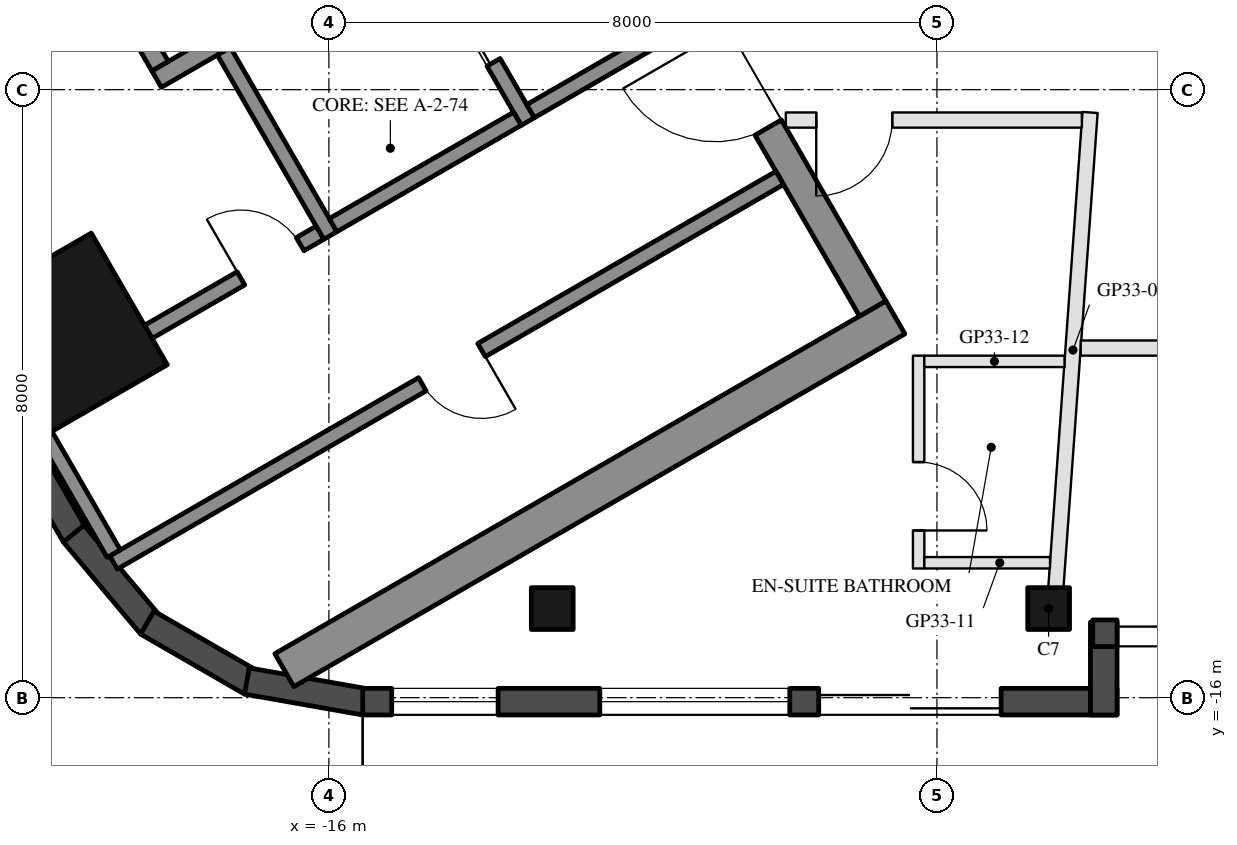
"""IFC4 building model, lengths in metres.
Left out: names, types, materials, properties, quantities, classifications, styles, units other than length and angle.
Written with IfcOpenShell. Run it as: python <this file> out.ifc"""

import sys

from ifc_helpers import new_model, si_unit, direction, frame, frame_2d, origin, origin_2d, place, context, subcontext, project, spatial, rectangle, hollow_rectangle, extrude, boolean, halfspace, element, fill, save


model = new_model("IFC4")
c1 = context("Model", 3, precision=1e-05, world=origin(), true_north=direction((0.0, 1.0)))
c2 = subcontext(c1, "Body", "Model", "MODEL_VIEW")
j1 = project(units=[si_unit("LENGTHUNIT", "METRE"), si_unit("PLANEANGLEUNIT", "RADIAN")], contexts=[c1])
p1 = place(None, origin())
s1 = spatial("IfcSite", under=j1, at=p1, CompositionType="ELEMENT")
p2 = place(p1, origin())
s2 = spatial("IfcBuilding", under=s1, at=p2, CompositionType="ELEMENT")
p3 = place(p2, frame((0.0, 0.0, 317.0)))
s3 = spatial("IfcBuildingStorey", under=s2, at=p3, CompositionType="ELEMENT", Elevation=317.0)
p4 = place(p3, frame((-13.061, -14.827, 0.0), z_axis=(0.0, 0.0, 1.0), x_axis=(-1.0, 0.0, 0.0)))
e1 = element("IfcColumn", 1, at=p4, inside=s3, PredefinedType="COLUMN", context=c2, shape_type="SweptSolid", body=[
    boolean("DIFFERENCE", extrude(hollow_rectangle(XDim=0.55, YDim=0.55, WallThickness=0.025, at=origin_2d()), origin(), (0.0, 0.0, 1.0), 3.7), halfspace(frame((0.0, 0.0, 3.66), z_axis=(0.0, 0.0, 1.0), x_axis=(1.0, 0.0, 0.0)), False)),
])
p5 = place(p3, frame((-6.531, -14.827, 0.0), z_axis=(0.0, 0.0, 1.0), x_axis=(-1.0, 0.0, 0.0)))
e2 = element("IfcColumn", 2, at=p5, inside=s3, PredefinedType="COLUMN", context=c2, shape_type="SweptSolid", body=[
    boolean("DIFFERENCE", extrude(hollow_rectangle(XDim=0.55, YDim=0.55, WallThickness=0.025, at=origin_2d()), origin(), (0.0, 0.0, 1.0), 3.7), halfspace(frame((0.0, 0.0, 3.666), z_axis=(0.0, 0.0, 1.0), x_axis=(1.0, 0.0, 0.0)), False)),
])
p6 = place(p3, frame((-19.492, -11.254, 0.0), z_axis=(0.0, 0.0, 1.0), x_axis=(-0.5, 0.866025403784, 0.0)))
e3 = element("IfcColumn", 3, at=p6, inside=s3, PredefinedType="COLUMN", context=c2, shape_type="SweptSolid", body=[
    boolean("DIFFERENCE", extrude(hollow_rectangle(XDim=2.0, YDim=2.0, WallThickness=0.05, at=origin_2d()), origin(), (0.0, 0.0, 1.0), 3.7), halfspace(frame((0.0, 0.0, 3.587), z_axis=(0.0, 0.0, 1.0), x_axis=(1.0, 0.0, 0.0)), False)),
])
p7 = place(p3, frame((-21.679, -9.816, 0.0), z_axis=(0.0, 0.0, 1.0), x_axis=(0.500023656998, -0.86601174498, 0.0)))
e4 = element("IfcWall", 4, at=p7, inside=s3, PredefinedType="SOLIDWALL", context=c2, shape_type="SweptSolid", body=[
    extrude(rectangle(XDim=4.677, YDim=0.35, at=frame_2d((2.339, 0.0))), origin(), (0.0, 0.0, 1.0), 3.55),
])
for number, where, z_axis, x_axis in (
    (5, (-19.358, -13.842, 0.0), (0.0, 0.0, 1.0), (0.643, -0.766, 0.0)),
    (6, (-18.389, -15.012, 0.0), (0.0, 0.0, 1.0), (0.866, -0.5, 0.0)),
    (7, (-17.079, -15.781, 0.0), (0.0, 0.0, 1.0), (0.985, -0.174, 0.0)),
):
    element("IfcWall", number, at=place(p3, frame(where, z_axis=z_axis, x_axis=x_axis)), inside=s3, PredefinedType="SOLIDWALL", context=c2, shape_type="SweptSolid", body=[
        extrude(rectangle(XDim=1.579, YDim=0.35, at=frame_2d((0.79, 0.0))), origin(), (0.0, 0.0, 1.0), 3.55),
    ])
p8 = place(p3, frame((-15.554, -16.052, 0.0), z_axis=(0.0, 0.0, 1.0), x_axis=(1.0, 0.0, 0.0)))
e8 = element("IfcWall", 8, at=p8, inside=s3, PredefinedType="SOLIDWALL", context=c2, shape_type="SweptSolid", body=[
    extrude(rectangle(XDim=9.924, YDim=0.35, at=frame_2d((4.962, 0.0))), origin(), (0.0, 0.0, 1.0), 3.55),
])
p9 = place(p8, frame((0.381, 0.0, 0.3)))
e9 = element("IfcOpeningElement", 9, at=p9, cuts=e8, PredefinedType="OPENING", context=c2, shape_type="SweptSolid", body=[
    extrude(rectangle(XDim=1.4, YDim=2.65, at=frame_2d((0.7, 1.325))), frame((0.0, 0.185, 0.0), z_axis=(0.0, -1.0, 0.0), x_axis=(1.0, 0.0, 0.0)), (0.0, 0.0, 1.0), 0.37),
])
p10 = place(p8, frame((5.999, 0.0, 0.0)))
e10 = element("IfcOpeningElement", 10, at=p10, cuts=e8, PredefinedType="OPENING", context=c2, shape_type="SweptSolid", body=[
    extrude(rectangle(XDim=2.4, YDim=2.4, at=frame_2d((1.2, 1.2))), frame((0.0, 0.185, 0.0), z_axis=(0.0, -1.0, 0.0), x_axis=(1.0, 0.0, 0.0)), (0.0, 0.0, 1.0), 0.37),
])
p11 = place(p8, frame((3.118, 0.0, 0.3)))
e11 = element("IfcOpeningElement", 11, at=p11, cuts=e8, PredefinedType="OPENING", context=c2, shape_type="SweptSolid", body=[
    extrude(rectangle(XDim=2.5, YDim=2.65, at=frame_2d((1.25, 1.325))), frame((0.0, 0.185, 0.0), z_axis=(0.0, -1.0, 0.0), x_axis=(1.0, 0.0, 0.0)), (0.0, 0.0, 1.0), 0.37),
])
p12 = place(p3, frame((-5.806, -16.228, 0.0), z_axis=(0.0, 0.0, 1.0), x_axis=(0.0, 1.0, 0.0)))
e12 = element("IfcWall", 12, at=p12, inside=s3, PredefinedType="SOLIDWALL", context=c2, shape_type="SweptSolid", body=[
    extrude(rectangle(XDim=1.22, YDim=0.35, at=frame_2d((0.61, 0.0))), origin(), (0.0, 0.0, 1.0), 3.55),
])
p13 = place(p3, frame((-5.951, -15.153, 0.0), z_axis=(0.0, 0.0, 1.0), x_axis=(1.0, 0.0, 0.0)))
e13 = element("IfcWall", 13, at=p13, inside=s3, PredefinedType="SOLIDWALL", context=c2, shape_type="SweptSolid", body=[
    extrude(rectangle(XDim=5.371, YDim=0.35, at=frame_2d((2.685, 0.0))), origin(), (0.0, 0.0, 1.0), 3.55),
])
p14 = place(p13, frame((0.32, 0.0, 0.0)))
e14 = element("IfcOpeningElement", 14, at=p14, cuts=e13, PredefinedType="OPENING", context=c2, shape_type="SweptSolid", body=[
    extrude(rectangle(XDim=2.4, YDim=2.4, at=frame_2d((1.2, 1.2))), frame((0.0, 0.185, 0.0), z_axis=(0.0, -1.0, 0.0), x_axis=(1.0, 0.0, 0.0)), (0.0, 0.0, 1.0), 0.37),
])
p15 = place(p13, frame((3.02, 0.0, 0.3)))
e15 = element("IfcOpeningElement", 15, at=p15, cuts=e13, PredefinedType="OPENING", context=c2, shape_type="SweptSolid", body=[
    extrude(rectangle(XDim=1.5, YDim=2.65, at=frame_2d((0.75, 1.325))), frame((0.0, 0.185, 0.0), z_axis=(0.0, -1.0, 0.0), x_axis=(1.0, 0.0, 0.0)), (0.0, 0.0, 1.0), 0.37),
])
p16 = place(p3, frame((-8.547, -10.997, 0.0), z_axis=(0.0, 0.0, 1.0), x_axis=(-0.866025286072, -0.500000203884, 0.0)))
e16 = element("IfcWall", 16, at=p16, inside=s3, PredefinedType="SHEAR", context=c2, shape_type="SweptSolid", body=[
    extrude(rectangle(XDim=9.283, YDim=0.5, at=frame_2d((4.641, 0.0))), origin(), (0.0, 0.0, 1.0), 3.5),
])
p17 = place(p3, frame((-13.845, -2.22, 0.0), z_axis=(0.0, 0.0, 1.0), x_axis=(0.500004234368, -0.866022959057, 0.0)))
e17 = element("IfcWall", 17, at=p17, inside=s3, PredefinedType="SHEAR", context=c2, shape_type="SweptSolid", body=[
    extrude(rectangle(XDim=10.0, YDim=0.4, at=frame_2d((5.0, 0.0))), origin(), (0.0, 0.0, 1.0), 3.5),
])
p18 = place(p17, frame((3.55, 0.0, 0.0)))
e18 = element("IfcOpeningElement", 18, at=p18, cuts=e17, PredefinedType="OPENING", context=c2, shape_type="SweptSolid", body=[
    extrude(rectangle(XDim=1.1, YDim=2.1, at=frame_2d((0.55, 1.05))), frame((0.0, 0.21, 0.0), z_axis=(0.0, -1.0, 0.0), x_axis=(1.0, 0.0, 0.0)), (0.0, 0.0, 1.0), 0.42),
])
p19 = place(p17, frame((5.85, 0.0, 0.0)))
e19 = element("IfcOpeningElement", 19, at=p19, cuts=e17, PredefinedType="OPENING", context=c2, shape_type="SweptSolid", body=[
    extrude(rectangle(XDim=1.4, YDim=2.1, at=frame_2d((0.7, 1.05))), frame((0.0, 0.21, 0.0), z_axis=(0.0, -1.0, 0.0), x_axis=(1.0, 0.0, 0.0)), (0.0, 0.0, 1.0), 0.42),
])
p20 = place(p3, frame((-12.681, -4.636, 0.0), z_axis=(0.0, 0.0, 1.0), x_axis=(-0.866021702275, -0.500006411147, 0.0)))
e20 = element("IfcWall", 20, at=p20, inside=s3, PredefinedType="SHEAR", context=c2, shape_type="SweptSolid", body=[
    extrude(rectangle(XDim=6.45, YDim=0.25, at=frame_2d((3.225, 0.0))), origin(), (0.0, 0.0, 1.0), 3.5),
])
p21 = place(p20, frame((0.3, 0.0, 0.0)))
e21 = element("IfcOpeningElement", 21, at=p21, cuts=e20, PredefinedType="OPENING", context=c2, shape_type="SweptSolid", body=[
    extrude(rectangle(XDim=1.0, YDim=2.1, at=frame_2d((0.5, 1.05))), frame((0.0, 0.135, 0.0), z_axis=(0.0, -1.0, 0.0), x_axis=(1.0, 0.0, 0.0)), (0.0, 0.0, 1.0), 0.27),
])
p22 = place(p3, frame((-19.496, -5.482, 0.0), z_axis=(0.0, 0.0, 1.0), x_axis=(0.499990435942, -0.866030925526, 0.0)))
e22 = element("IfcWall", 22, at=p22, inside=s3, PredefinedType="SHEAR", context=c2, shape_type="SweptSolid", body=[
    extrude(rectangle(XDim=2.55, YDim=0.25, at=frame_2d((1.275, 0.0))), origin(), (0.0, 0.0, 1.0), 3.5),
])
p23 = place(p3, frame((-17.381, -7.495, 0.0), z_axis=(0.0, 0.0, 1.0), x_axis=(0.500011755427, -0.866018616679, 0.0)))
e23 = element("IfcWall", 23, at=p23, inside=s3, PredefinedType="SHEAR", context=c2, shape_type="SweptSolid", body=[
    extrude(rectangle(XDim=2.8, YDim=0.2, at=frame_2d((1.4, 0.0))), origin(), (0.0, 0.0, 1.0), 3.5),
])
p24 = place(p3, frame((-14.783, -5.995, 0.0), z_axis=(0.0, 0.0, 1.0), x_axis=(0.49994636267, -0.866056369097, 0.0)))
e24 = element("IfcWall", 24, at=p24, inside=s3, PredefinedType="SHEAR", context=c2, shape_type="SweptSolid", body=[
    extrude(rectangle(XDim=2.8, YDim=0.2, at=frame_2d((1.4, 0.0))), origin(), (0.0, 0.0, 1.0), 3.5),
])
p25 = place(p24, frame((0.7, 0.0, 0.0)))
e25 = element("IfcOpeningElement", 25, at=p25, cuts=e24, PredefinedType="OPENING", context=c2, shape_type="SweptSolid", body=[
    extrude(rectangle(XDim=1.2, YDim=2.1, at=frame_2d((0.6, 1.05))), frame((0.0, 0.11, 0.0), z_axis=(0.0, -1.0, 0.0), x_axis=(1.0, 0.0, 0.0)), (0.0, 0.0, 1.0), 0.22),
])
p26 = place(p3, frame((-13.52, -8.383, 0.0), z_axis=(0.0, 0.0, 1.0), x_axis=(-0.866034573852, -0.49998411664, 0.0)))
e26 = element("IfcWall", 26, at=p26, inside=s3, PredefinedType="SHEAR", context=c2, shape_type="SweptSolid", body=[
    extrude(rectangle(XDim=2.8, YDim=0.2, at=frame_2d((1.4, 0.0))), origin(), (0.0, 0.0, 1.0), 3.5),
])
p27 = place(p3, frame((-11.268, -7.083, 0.0), z_axis=(0.0, 0.0, 1.0), x_axis=(-0.866050077142, -0.499957262057, 0.0)))
e27 = element("IfcWall", 27, at=p27, inside=s3, PredefinedType="SHEAR", context=c2, shape_type="SweptSolid", body=[
    extrude(rectangle(XDim=2.4, YDim=0.2, at=frame_2d((1.2, 0.0))), origin(), (0.0, 0.0, 1.0), 3.5),
])
p28 = place(p3, frame((-10.068, -9.162, 0.0), z_axis=(0.0, 0.0, 1.0), x_axis=(-0.866030125237, -0.499991822116, 0.0)))
e28 = element("IfcWall", 28, at=p28, inside=s3, PredefinedType="SHEAR", context=c2, shape_type="SweptSolid", body=[
    extrude(rectangle(XDim=10.121, YDim=0.2, at=frame_2d((5.061, 0.0))), origin(), (0.0, 0.0, 1.0), 3.5),
])
p29 = place(p28, frame((4.53, 0.0, 0.0)))
e29 = element("IfcOpeningElement", 29, at=p29, cuts=e28, PredefinedType="OPENING", context=c2, shape_type="SweptSolid", body=[
    extrude(rectangle(XDim=0.9, YDim=2.1, at=frame_2d((0.45, 1.05))), frame((0.0, 0.11, 0.0), z_axis=(0.0, -1.0, 0.0), x_axis=(1.0, 0.0, 0.0)), (0.0, 0.0, 1.0), 0.22),
])
p30 = place(p3, frame((-19.73, -12.546, 0.0), z_axis=(0.0, 0.0, 1.0), x_axis=(0.500004188491, -0.866022985545, 0.0)))
e30 = element("IfcWall", 30, at=p30, inside=s3, PredefinedType="SHEAR", context=c2, shape_type="SweptSolid", body=[
    extrude(rectangle(XDim=1.8, YDim=0.2, at=frame_2d((0.9, 0.0))), origin(), (0.0, 0.0, 1.0), 3.5),
])
p31 = place(p3, frame((-16.118, -9.883, 0.0), z_axis=(0.0, 0.0, 1.0), x_axis=(-0.866045268016, -0.499965592563, 0.0)))
e31 = element("IfcWall", 31, at=p31, inside=s3, PredefinedType="SHEAR", context=c2, shape_type="SweptSolid", body=[
    extrude(rectangle(XDim=2.608, YDim=0.2, at=frame_2d((1.304, 0.0))), origin(), (0.0, 0.0, 1.0), 3.5),
])
p32 = place(p31, frame((0.3, 0.0, 0.0)))
e32 = element("IfcOpeningElement", 32, at=p32, cuts=e31, PredefinedType="OPENING", context=c2, shape_type="SweptSolid", body=[
    extrude(rectangle(XDim=0.9, YDim=2.1, at=frame_2d((0.45, 1.05))), frame((0.0, 0.11, 0.0), z_axis=(0.0, -1.0, 0.0), x_axis=(1.0, 0.0, 0.0)), (0.0, 0.0, 1.0), 0.22),
])
p33 = place(p3, frame((-6.435, -14.552, 0.0), z_axis=(0.0, 0.0, 1.0), x_axis=(0.071739706377, 0.997423387799, 0.0)))
e33 = element("IfcWall", 33, at=p33, inside=s3, PredefinedType="PARTITIONING", context=c2, shape_type="SweptSolid", body=[
    extrude(rectangle(XDim=6.269, YDim=0.2, at=frame_2d((3.134, 0.0))), origin(), (0.0, 0.0, 1.0), 3.1),
])
p34 = place(p3, frame((-6.093, -8.4, 0.0), z_axis=(0.0, 0.0, 1.0), x_axis=(-1.0, 0.0, 0.0)))
e34 = element("IfcWall", 34, at=p34, inside=s3, PredefinedType="PARTITIONING", context=c2, shape_type="SweptSolid", body=[
    extrude(rectangle(XDim=3.895, YDim=0.2, at=frame_2d((1.948, 0.0))), origin(), (0.0, 0.0, 1.0), 3.1),
])
p35 = place(p34, frame((2.495, 0.0, 0.0)))
e35 = element("IfcOpeningElement", 35, at=p35, cuts=e34, PredefinedType="OPENING", context=c2, shape_type="SweptSolid", body=[
    extrude(rectangle(XDim=1.0, YDim=2.1, at=frame_2d((0.5, 1.05))), frame((0.0, 0.11, 0.0), z_axis=(0.0, -1.0, 0.0), x_axis=(1.0, 0.0, 0.0)), (0.0, 0.0, 1.0), 0.22),
])
p36 = place(p3, frame((-8.241, -11.5, 0.0), z_axis=(0.0, 0.0, 1.0), x_axis=(0.0, -1.0, 0.0)))
e36 = element("IfcWall", 36, at=p36, inside=s3, PredefinedType="PARTITIONING", context=c2, shape_type="SweptSolid", body=[
    extrude(rectangle(XDim=2.8, YDim=0.15, at=frame_2d((1.4, 0.0))), origin(), (0.0, 0.0, 1.0), 3.1),
])
p37 = place(p36, frame((1.4, 0.0, 0.0)))
e37 = element("IfcOpeningElement", 37, at=p37, cuts=e36, PredefinedType="OPENING", context=c2, shape_type="SweptSolid", body=[
    extrude(rectangle(XDim=0.9, YDim=2.1, at=frame_2d((0.45, 1.05))), frame((0.0, 0.085, 0.0), z_axis=(0.0, -1.0, 0.0), x_axis=(1.0, 0.0, 0.0)), (0.0, 0.0, 1.0), 0.17),
])
p38 = place(p3, frame((-8.166, -14.225, 0.0), z_axis=(0.0, 0.0, 1.0), x_axis=(1.0, 0.0, 0.0)))
e38 = element("IfcWall", 38, at=p38, inside=s3, PredefinedType="PARTITIONING", context=c2, shape_type="SweptSolid", body=[
    extrude(rectangle(XDim=1.654, YDim=0.15, at=frame_2d((0.827, 0.0))), origin(), (0.0, 0.0, 1.0), 3.1),
])
p39 = place(p3, frame((-8.166, -11.575, 0.0), z_axis=(0.0, 0.0, 1.0), x_axis=(1.0, 0.0, 0.0)))
e39 = element("IfcWall", 39, at=p39, inside=s3, PredefinedType="PARTITIONING", context=c2, shape_type="SweptSolid", body=[
    extrude(rectangle(XDim=1.845, YDim=0.15, at=frame_2d((0.922, 0.0))), origin(), (0.0, 0.0, 1.0), 3.1),
])
p40 = place(p3, frame((0.571, -11.4, 0.0), z_axis=(0.0, 0.0, 1.0), x_axis=(-1.0, 0.0, 0.0)))
e40 = element("IfcWall", 40, at=p40, inside=s3, PredefinedType="PARTITIONING", context=c2, shape_type="SweptSolid", body=[
    extrude(rectangle(XDim=6.679, YDim=0.2, at=frame_2d((3.34, 0.0))), origin(), (0.0, 0.0, 1.0), 3.1),
])
p41 = place(p40, frame((2.84, 0.0, 0.0)))
e41 = element("IfcOpeningElement", 41, at=p41, cuts=e40, PredefinedType="OPENING", context=c2, shape_type="SweptSolid", body=[
    extrude(rectangle(XDim=1.0, YDim=2.1, at=frame_2d((0.5, 1.05))), frame((0.0, 0.11, 0.0), z_axis=(0.0, -1.0, 0.0), x_axis=(1.0, 0.0, 0.0)), (0.0, 0.0, 1.0), 0.22),
])
p42 = place(p9, origin())
e42 = element("IfcWindow", 42, at=p42, inside=s3, PartitioningType="SINGLE_PANEL", PredefinedType="WINDOW", context=c2, shape_type="SweptSolid", body=[
    extrude(rectangle(XDim=1.4, YDim=2.65, at=frame_2d((0.7, 1.325))), frame((0.0, 0.03, 0.0), z_axis=(0.0, -1.0, 0.0), x_axis=(1.0, 0.0, 0.0)), (0.0, 0.0, 1.0), 0.06),
])
fill(e9, e42)
p43 = place(p10, frame((2.4, 0.0, 0.0), z_axis=(0.0, 0.0, 1.0), x_axis=(-1.0, 0.0, 0.0)))
e43 = element("IfcDoor", 43, at=p43, inside=s3, OperationType="SLIDING_TO_LEFT", PredefinedType="DOOR", context=c2, shape_type="SweptSolid", body=[
    extrude(rectangle(XDim=2.4, YDim=2.4, at=frame_2d((1.2, 1.2))), frame((0.0, 0.025, 0.0), z_axis=(0.0, -1.0, 0.0), x_axis=(1.0, 0.0, 0.0)), (0.0, 0.0, 1.0), 0.05),
])
fill(e10, e43)
p44 = place(p11, origin())
e44 = element("IfcWindow", 44, at=p44, inside=s3, PartitioningType="SINGLE_PANEL", PredefinedType="WINDOW", context=c2, shape_type="SweptSolid", body=[
    extrude(rectangle(XDim=2.5, YDim=2.65, at=frame_2d((1.25, 1.325))), frame((0.0, 0.03, 0.0), z_axis=(0.0, -1.0, 0.0), x_axis=(1.0, 0.0, 0.0)), (0.0, 0.0, 1.0), 0.06),
])
fill(e11, e44)
p45 = place(p14, frame((2.4, 0.0, 0.0), z_axis=(0.0, 0.0, 1.0), x_axis=(-1.0, 0.0, 0.0)))
e45 = element("IfcDoor", 45, at=p45, inside=s3, OperationType="SLIDING_TO_LEFT", PredefinedType="DOOR", context=c2, shape_type="SweptSolid", body=[
    extrude(rectangle(XDim=2.4, YDim=2.4, at=frame_2d((1.2, 1.2))), frame((0.0, 0.025, 0.0), z_axis=(0.0, -1.0, 0.0), x_axis=(1.0, 0.0, 0.0)), (0.0, 0.0, 1.0), 0.05),
])
fill(e14, e45)
p46 = place(p25, origin())
e46 = element("IfcDoor", 46, at=p46, inside=s3, OperationType="DOUBLE_DOOR_SLIDING", PredefinedType="DOOR", context=c2, shape_type="SweptSolid", body=[
    extrude(rectangle(XDim=1.2, YDim=2.1, at=frame_2d((0.6, 1.05))), frame((0.0, 0.025, 0.0), z_axis=(0.0, -1.0, 0.0), x_axis=(1.0, 0.0, 0.0)), (0.0, 0.0, 1.0), 0.05),
])
fill(e25, e46)
p47 = place(p29, origin())
e47 = element("IfcDoor", 47, at=p47, inside=s3, OperationType="SINGLE_SWING_LEFT", PredefinedType="DOOR", context=c2, shape_type="SweptSolid", body=[
    extrude(rectangle(XDim=0.9, YDim=2.1, at=frame_2d((0.45, 1.05))), frame((0.0, 0.025, 0.0), z_axis=(0.0, -1.0, 0.0), x_axis=(1.0, 0.0, 0.0)), (0.0, 0.0, 1.0), 0.05),
])
fill(e29, e47)
p48 = place(p32, frame((0.9, 0.0, 0.0), z_axis=(0.0, 0.0, 1.0), x_axis=(-1.0, 0.0, 0.0)))
e48 = element("IfcDoor", 48, at=p48, inside=s3, OperationType="SINGLE_SWING_LEFT", PredefinedType="DOOR", context=c2, shape_type="SweptSolid", body=[
    extrude(rectangle(XDim=0.9, YDim=2.1, at=frame_2d((0.45, 1.05))), frame((0.0, 0.025, 0.0), z_axis=(0.0, -1.0, 0.0), x_axis=(1.0, 0.0, 0.0)), (0.0, 0.0, 1.0), 0.05),
])
fill(e32, e48)
p49 = place(p19, frame((1.4, 0.0, 0.0), z_axis=(0.0, 0.0, 1.0), x_axis=(-1.0, 0.0, 0.0)))
e49 = element("IfcDoor", 49, at=p49, inside=s3, OperationType="DOUBLE_DOOR_SINGLE_SWING", PredefinedType="DOOR", context=c2, shape_type="SweptSolid", body=[
    extrude(rectangle(XDim=1.4, YDim=2.1, at=frame_2d((0.7, 1.05))), frame((0.0, 0.025, 0.0), z_axis=(0.0, -1.0, 0.0), x_axis=(1.0, 0.0, 0.0)), (0.0, 0.0, 1.0), 0.05),
])
fill(e19, e49)
p50 = place(p37, origin())
e50 = element("IfcDoor", 50, at=p50, inside=s3, OperationType="SINGLE_SWING_RIGHT", PredefinedType="DOOR", context=c2, shape_type="SweptSolid", body=[
    extrude(rectangle(XDim=0.9, YDim=2.1, at=frame_2d((0.45, 1.05))), frame((0.0, 0.025, 0.0), z_axis=(0.0, -1.0, 0.0), x_axis=(1.0, 0.0, 0.0)), (0.0, 0.0, 1.0), 0.05),
])
fill(e37, e50)
p51 = place(p35, origin())
e51 = element("IfcDoor", 51, at=p51, inside=s3, OperationType="SINGLE_SWING_RIGHT", PredefinedType="DOOR", context=c2, shape_type="SweptSolid", body=[
    extrude(rectangle(XDim=1.0, YDim=2.1, at=frame_2d((0.5, 1.05))), frame((0.0, 0.025, 0.0), z_axis=(0.0, -1.0, 0.0), x_axis=(1.0, 0.0, 0.0)), (0.0, 0.0, 1.0), 0.05),
])
fill(e35, e51)
save(model, sys.argv[1])
